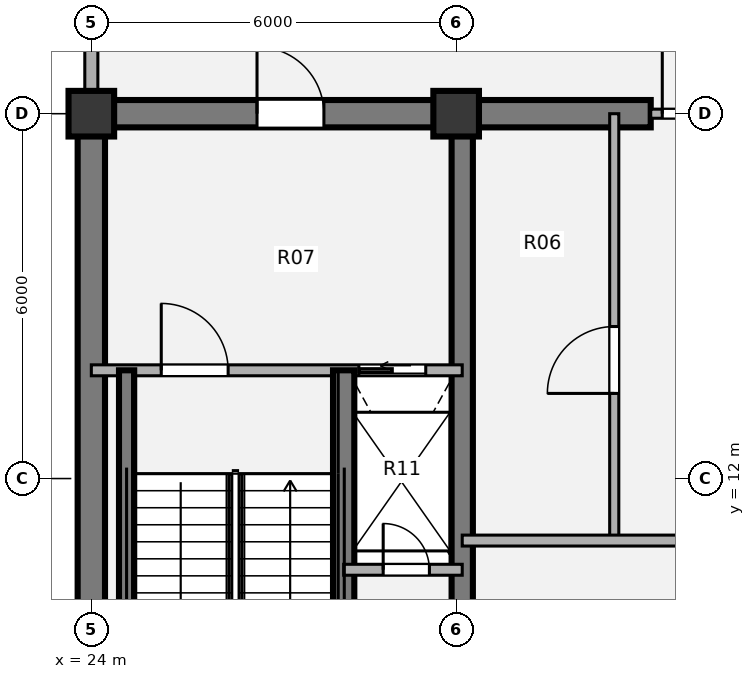
"""IFC4 building model, lengths in metres.
Left out: names, types, materials, properties, quantities, classifications, styles, units other than length and angle.
Written with IfcOpenShell. Run it as: python <this file> out.ifc"""

import sys

from ifc_helpers import new_model, si_unit, direction, frame, frame_2d, origin, origin_2d, place, context, subcontext, project, spatial, rectangle, extrude, source, transform, mapped, element, fill, save


model = new_model("IFC4")
c1 = context("Model", 3, precision=1e-05, world=origin(), true_north=direction((0.0, 1.0)))
c2 = subcontext(c1, "Body", "Model", "MODEL_VIEW")
j1 = project(units=[si_unit("LENGTHUNIT", "METRE"), si_unit("PLANEANGLEUNIT", "RADIAN")], contexts=[c1])
p1 = place(None, origin())
s1 = spatial("IfcSite", under=j1, at=p1, CompositionType="ELEMENT")
p2 = place(p1, origin())
s2 = spatial("IfcBuilding", under=s1, at=p2, CompositionType="ELEMENT")
p3 = place(p2, frame((0.0, 0.0, 151.92)))
s3 = spatial("IfcBuildingStorey", under=s2, at=p3, CompositionType="ELEMENT", Elevation=151.92)
m1 = source(origin(), c2, "Body", "SweptSolid", [
    extrude(rectangle(XDim=0.75, YDim=0.75, at=origin_2d()), origin(), (0.0, 0.0, 1.0), 4.5),
])
for number, where, z_axis, x_axis in (
    (1, (24.0, 18.0, 0.0), (0.0, 0.0, 1.0), (1.0, 0.0, 0.0)),
    (2, (30.0, 18.0, 0.0), (0.0, 0.0, 1.0), (1.0, 0.0, 0.0)),
):
    element("IfcColumn", number, at=place(p3, frame(where, z_axis=z_axis, x_axis=x_axis)), inside=s3, PredefinedType="COLUMN", context=c2, shape_type="MappedRepresentation", body=[
        mapped(m1, transform((0.0, 0.0, 0.0), x_axis=(1.0, 0.0, 0.0), y_axis=(0.0, 1.0, 0.0), z_axis=(0.0, 0.0, 1.0), scale=1.0)),
    ])
p4 = place(p3, frame((24.0, 6.0, 0.0), z_axis=(0.0, 0.0, 1.0), x_axis=(0.0, 1.0, 0.0)))
e3 = element("IfcWall", 3, at=p4, inside=s3, PredefinedType="SHEAR", context=c2, shape_type="SweptSolid", body=[
    extrude(rectangle(XDim=12.0, YDim=0.45, at=frame_2d((6.0, 0.0))), origin(), (0.0, 0.0, 1.0), 4.5),
])
p5 = place(p3, frame((23.775, 18.0, 0.0), z_axis=(0.0, 0.0, 1.0), x_axis=(1.0, 0.0, 0.0)))
e4 = element("IfcWall", 4, at=p5, inside=s3, PredefinedType="SHEAR", context=c2, shape_type="SweptSolid", body=[
    extrude(rectangle(XDim=9.425, YDim=0.45, at=frame_2d((4.712, 0.0))), origin(), (0.0, 0.0, 1.0), 4.5),
])
p6 = place(p5, frame((2.95, 0.0, 0.0)))
e5 = element("IfcOpeningElement", 5, at=p6, cuts=e4, PredefinedType="OPENING", context=c2, shape_type="SweptSolid", body=[
    extrude(rectangle(XDim=1.1, YDim=2.1, at=origin_2d()), frame((0.55, 0.235, 1.05), z_axis=(0.0, -1.0, 0.0), x_axis=(1.0, 0.0, 0.0)), (0.0, 0.0, 1.0), 0.47),
])
p7 = place(p3, frame((30.1, 6.0, 0.0), z_axis=(0.0, 0.0, 1.0), x_axis=(0.0, 1.0, 0.0)))
e6 = element("IfcWall", 6, at=p7, inside=s3, PredefinedType="SHEAR", context=c2, shape_type="SweptSolid", body=[
    extrude(rectangle(XDim=12.0, YDim=0.35, at=frame_2d((6.0, 0.0))), origin(), (0.0, 0.0, 1.0), 4.5),
])
p8 = place(p3, frame((24.0, 18.355, 0.0), z_axis=(0.0, 0.0, 1.0), x_axis=(0.0, 1.0, 0.0)))
e7 = element("IfcWall", 7, at=p8, inside=s3, PredefinedType="SOLIDWALL", context=c2, shape_type="SweptSolid", body=[
    extrude(rectangle(XDim=2.695, YDim=0.215, at=frame_2d((1.348, 0.0))), origin(), (0.0, 0.0, 1.0), 2.28),
])
p9 = place(p3, frame((32.6, 11.0, 0.0), z_axis=(0.0, 0.0, 1.0), x_axis=(0.0, 1.0, 0.0)))
e8 = element("IfcWall", 8, at=p9, inside=s3, PredefinedType="PARTITIONING", context=c2, shape_type="SweptSolid", body=[
    extrude(rectangle(XDim=7.0, YDim=0.15, at=frame_2d((3.5, 0.0))), origin(), (0.0, 0.0, 1.0), 4.062),
])
p10 = place(p9, frame((2.4, 0.0, 0.0)))
e9 = element("IfcOpeningElement", 9, at=p10, cuts=e8, PredefinedType="OPENING", context=c2, shape_type="SweptSolid", body=[
    extrude(rectangle(XDim=1.1, YDim=2.1, at=origin_2d()), frame((0.55, 0.085, 1.05), z_axis=(0.0, -1.0, 0.0), x_axis=(1.0, 0.0, 0.0)), (0.0, 0.0, 1.0), 0.17),
])
p11 = place(p3, frame((30.1, 10.98, 0.0), z_axis=(0.0, 0.0, 1.0), x_axis=(1.0, 0.0, 0.0)))
e10 = element("IfcWall", 10, at=p11, inside=s3, PredefinedType="PARTITIONING", context=c2, shape_type="SweptSolid", body=[
    extrude(rectangle(XDim=4.08, YDim=0.18, at=frame_2d((2.04, 0.0))), origin(), (0.0, 0.0, 1.0), 4.062),
])
p12 = place(p3, frame((33.2, 18.0, 0.0), z_axis=(0.0, 0.0, 1.0), x_axis=(1.0, 0.0, 0.0)))
e11 = element("IfcWall", 11, at=p12, inside=s3, PredefinedType="PARTITIONING", context=c2, shape_type="SweptSolid", body=[
    extrude(rectangle(XDim=5.6, YDim=0.15, at=frame_2d((2.8, 0.0))), origin(), (0.0, 0.0, 1.0), 3.077),
])
p13 = place(p12, frame((0.19, 0.0, 0.0)))
e12 = element("IfcOpeningElement", 12, at=p13, cuts=e11, PredefinedType="OPENING", context=c2, shape_type="SweptSolid", body=[
    extrude(rectangle(XDim=1.1, YDim=2.1, at=origin_2d()), frame((0.55, 0.085, 1.05), z_axis=(0.0, -1.0, 0.0), x_axis=(1.0, 0.0, 0.0)), (0.0, 0.0, 1.0), 0.17),
])
p14 = place(p12, frame((4.31, 0.0, 0.0)))
e13 = element("IfcOpeningElement", 13, at=p14, cuts=e11, PredefinedType="OPENING", context=c2, shape_type="SweptSolid", body=[
    extrude(rectangle(XDim=1.1, YDim=2.1, at=origin_2d()), frame((0.55, 0.085, 1.05), z_axis=(0.0, -1.0, 0.0), x_axis=(1.0, 0.0, 0.0)), (0.0, 0.0, 1.0), 0.17),
])
p15 = place(p3, frame((24.0, 13.78, 0.0), z_axis=(0.0, 0.0, 1.0), x_axis=(1.0, 0.0, 0.0)))
e14 = element("IfcWall", 14, at=p15, inside=s3, PredefinedType="PARTITIONING", context=c2, shape_type="SweptSolid", body=[
    extrude(rectangle(XDim=6.1, YDim=0.18, at=frame_2d((3.05, 0.0))), origin(), (0.0, 0.0, 1.0), 4.062),
])
p16 = place(p15, frame((1.15, 0.0, 0.0)))
e15 = element("IfcOpeningElement", 15, at=p16, cuts=e14, PredefinedType="OPENING", context=c2, shape_type="SweptSolid", body=[
    extrude(rectangle(XDim=1.1, YDim=2.1, at=origin_2d()), frame((0.55, 0.1, 1.05), z_axis=(0.0, -1.0, 0.0), x_axis=(1.0, 0.0, 0.0)), (0.0, 0.0, 1.0), 0.2),
])
p17 = place(p15, frame((4.4, 0.0, 0.0)))
e16 = element("IfcOpeningElement", 16, at=p17, cuts=e14, PredefinedType="OPENING", context=c2, shape_type="SweptSolid", body=[
    extrude(rectangle(XDim=1.1, YDim=2.1, at=origin_2d()), frame((0.55, 0.1, 1.05), z_axis=(0.0, -1.0, 0.0), x_axis=(1.0, 0.0, 0.0)), (0.0, 0.0, 1.0), 0.2),
])
p18 = place(p3, frame((28.15, 6.0, 0.0), z_axis=(0.0, 0.0, 1.0), x_axis=(0.0, 1.0, 0.0)))
e17 = element("IfcWall", 17, at=p18, inside=s3, PredefinedType="SHEAR", context=c2, shape_type="SweptSolid", body=[
    extrude(rectangle(XDim=7.78, YDim=0.35, at=frame_2d((3.89, 0.0))), origin(), (0.0, 0.0, 1.0), 4.412),
])
p19 = place(p3, frame((24.58, 6.0, 0.0), z_axis=(0.0, 0.0, 1.0), x_axis=(0.0, 1.0, 0.0)))
e18 = element("IfcWall", 18, at=p19, inside=s3, PredefinedType="SHEAR", context=c2, shape_type="SweptSolid", body=[
    extrude(rectangle(XDim=7.78, YDim=0.25, at=frame_2d((3.89, 0.0))), origin(), (0.0, 0.0, 1.0), 4.412),
])
p20 = place(p3, frame((28.15, 10.5, 0.0), z_axis=(0.0, 0.0, 1.0), x_axis=(1.0, 0.0, 0.0)))
e19 = element("IfcWall", 19, at=p20, inside=s3, PredefinedType="PARTITIONING", context=c2, shape_type="SweptSolid", body=[
    extrude(rectangle(XDim=1.95, YDim=0.18, at=frame_2d((0.975, 0.0))), origin(), (0.0, 0.0, 1.0), 4.062),
])
p21 = place(p20, frame((0.65, 0.0, 0.0)))
e20 = element("IfcOpeningElement", 20, at=p21, cuts=e19, PredefinedType="OPENING", context=c2, shape_type="SweptSolid", body=[
    extrude(rectangle(XDim=0.76, YDim=2.05, at=origin_2d()), frame((0.38, 0.1, 1.025), z_axis=(0.0, -1.0, 0.0), x_axis=(1.0, 0.0, 0.0)), (0.0, 0.0, 1.0), 0.2),
])
m2 = source(origin(), c2, "Body", "SweptSolid", [
    extrude(rectangle(XDim=1.1, YDim=2.1, at=origin_2d()), frame((0.55, 0.025, 1.05), z_axis=(0.0, -1.0, 0.0), x_axis=(1.0, 0.0, 0.0)), (0.0, 0.0, 1.0), 0.05),
])
p22 = place(p10, origin())
e21 = element("IfcDoor", 21, at=p22, inside=s3, OperationType="SINGLE_SWING_LEFT", PredefinedType="DOOR", context=c2, shape_type="MappedRepresentation", body=[
    mapped(m2, transform((0.0, 0.0, 0.0), x_axis=(1.0, 0.0, 0.0), y_axis=(0.0, 1.0, 0.0), z_axis=(0.0, 0.0, 1.0), scale=1.0)),
])
fill(e9, e21)
m3 = source(origin(), c2, "Body", "SweptSolid", [
    extrude(rectangle(XDim=1.1, YDim=2.1, at=origin_2d()), frame((0.55, 0.025, 1.05), z_axis=(0.0, -1.0, 0.0), x_axis=(1.0, 0.0, 0.0)), (0.0, 0.0, 1.0), 0.05),
])
p23 = place(p13, origin())
e22 = element("IfcDoor", 22, at=p23, inside=s3, OperationType="SINGLE_SWING_LEFT", PredefinedType="DOOR", context=c2, shape_type="MappedRepresentation", body=[
    mapped(m3, transform((0.0, 0.0, 0.0), x_axis=(1.0, 0.0, 0.0), y_axis=(0.0, 1.0, 0.0), z_axis=(0.0, 0.0, 1.0), scale=1.0)),
])
fill(e12, e22)
m4 = source(origin(), c2, "Body", "SweptSolid", [
    extrude(rectangle(XDim=1.1, YDim=2.1, at=origin_2d()), frame((0.55, 0.025, 1.05), z_axis=(0.0, -1.0, 0.0), x_axis=(1.0, 0.0, 0.0)), (0.0, 0.0, 1.0), 0.05),
])
p24 = place(p16, origin())
e23 = element("IfcDoor", 23, at=p24, inside=s3, OperationType="SINGLE_SWING_LEFT", PredefinedType="DOOR", context=c2, shape_type="MappedRepresentation", body=[
    mapped(m4, transform((0.0, 0.0, 0.0), x_axis=(1.0, 0.0, 0.0), y_axis=(0.0, 1.0, 0.0), z_axis=(0.0, 0.0, 1.0), scale=1.0)),
])
fill(e15, e23)
m5 = source(origin(), c2, "Body", "SweptSolid", [
    extrude(rectangle(XDim=1.1, YDim=2.1, at=origin_2d()), frame((0.55, 0.025, 1.05), z_axis=(0.0, -1.0, 0.0), x_axis=(1.0, 0.0, 0.0)), (0.0, 0.0, 1.0), 0.05),
])
p25 = place(p17, origin())
e24 = element("IfcDoor", 24, at=p25, inside=s3, OperationType="SLIDING_TO_LEFT", PredefinedType="DOOR", context=c2, shape_type="MappedRepresentation", body=[
    mapped(m5, transform((0.0, 0.0, 0.0), x_axis=(1.0, 0.0, 0.0), y_axis=(0.0, 1.0, 0.0), z_axis=(0.0, 0.0, 1.0), scale=1.0)),
])
fill(e16, e24)
m6 = source(origin(), c2, "Body", "SweptSolid", [
    extrude(rectangle(XDim=0.76, YDim=2.05, at=origin_2d()), frame((0.38, 0.025, 1.025), z_axis=(0.0, -1.0, 0.0), x_axis=(1.0, 0.0, 0.0)), (0.0, 0.0, 1.0), 0.05),
])
p26 = place(p21, origin())
e25 = element("IfcDoor", 25, at=p26, inside=s3, OperationType="SINGLE_SWING_LEFT", PredefinedType="DOOR", context=c2, shape_type="MappedRepresentation", body=[
    mapped(m6, transform((0.0, 0.0, 0.0), x_axis=(1.0, 0.0, 0.0), y_axis=(0.0, 1.0, 0.0), z_axis=(0.0, 0.0, 1.0), scale=1.0)),
])
fill(e20, e25)
p27 = place(p6, origin())
e26 = element("IfcDoor", 26, at=p27, inside=s3, OperationType="SINGLE_SWING_LEFT", PredefinedType="DOOR", context=c2, shape_type="MappedRepresentation", body=[
    mapped(m3, transform((0.0, 0.0, 0.0), x_axis=(1.0, 0.0, 0.0), y_axis=(0.0, 1.0, 0.0), z_axis=(0.0, 0.0, 1.0), scale=1.0)),
])
fill(e5, e26)
save(model, sys.argv[1])
